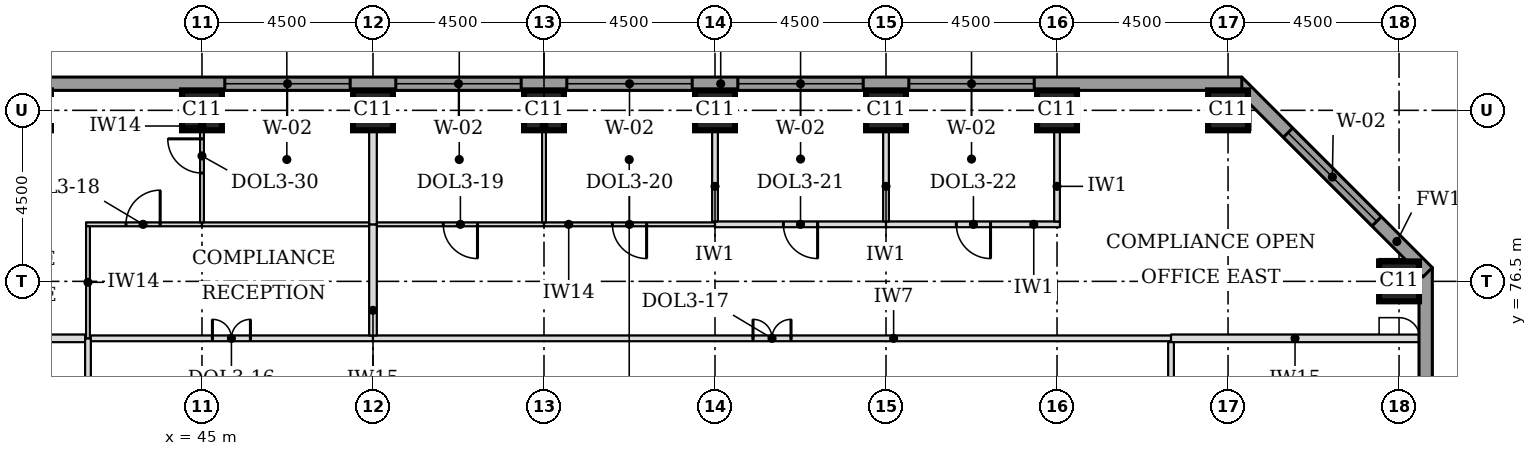
"""IFC4 building model, lengths in metres.
Left out: names, types, materials, properties, quantities, classifications, styles, units other than length and angle.
Written with IfcOpenShell. Run it as: python <this file> out.ifc"""

import sys

from ifc_helpers import new_model, si_unit, direction, frame, frame_2d, origin, origin_2d, place, context, subcontext, project, spatial, rectangle, extrude, element, fill, save


model = new_model("IFC4")
c1 = context("Model", 3, precision=1e-05, world=origin(), true_north=direction((0.0, 1.0)))
c2 = subcontext(c1, "Body", "Model", "MODEL_VIEW")
j1 = project(units=[si_unit("LENGTHUNIT", "METRE"), si_unit("PLANEANGLEUNIT", "RADIAN")], contexts=[c1])
p1 = place(None, origin())
s1 = spatial("IfcSite", under=j1, at=p1, CompositionType="ELEMENT")
p2 = place(p1, origin())
s2 = spatial("IfcBuilding", under=s1, at=p2, CompositionType="ELEMENT")
p3 = place(p2, frame((0.0, 0.0, 97.4)))
s3 = spatial("IfcBuildingStorey", under=s2, at=p3, CompositionType="ELEMENT", Elevation=97.4)
for number, where, z_axis, x_axis in (
    (1, (76.5, 76.5, 0.0), (0.0, 0.0, 1.0), (1.0, 0.0, 0.0)),
    (2, (45.0, 81.0, 0.0), (0.0, 0.0, 1.0), (1.0, 0.0, 0.0)),
    (3, (49.5, 81.0, 0.0), (0.0, 0.0, 1.0), (1.0, 0.0, 0.0)),
    (4, (54.0, 81.0, 0.0), (0.0, 0.0, 1.0), (1.0, 0.0, 0.0)),
    (5, (58.5, 81.0, 0.0), (0.0, 0.0, 1.0), (1.0, 0.0, 0.0)),
    (6, (63.0, 81.0, 0.0), (0.0, 0.0, 1.0), (1.0, 0.0, 0.0)),
    (7, (67.5, 81.0, 0.0), (0.0, 0.0, 1.0), (1.0, 0.0, 0.0)),
    (8, (72.0, 81.0, 0.0), (0.0, 0.0, 1.0), (1.0, 0.0, 0.0)),
):
    element("IfcColumn", number, at=place(p3, frame(where, z_axis=z_axis, x_axis=x_axis)), inside=s3, PredefinedType="COLUMN", context=c2, shape_type="SweptSolid", body=[
        extrude(rectangle(XDim=1.05, YDim=1.05, at=origin_2d()), origin(), (0.0, 0.0, 1.0), 3.7),
    ])
p4 = place(p3, frame((77.2, 44.638, 0.0), z_axis=(0.0, 0.0, 1.0), x_axis=(0.0, 1.0, 0.0)))
e9 = element("IfcWall", 9, at=p4, inside=s3, PredefinedType="STANDARD", context=c2, shape_type="SweptSolid", body=[
    extrude(rectangle(XDim=32.225, YDim=0.35, at=frame_2d((16.112, 0.0))), origin(), (0.0, 0.0, 1.0), 3.525),
])
p5 = place(p4, frame((5.462, 0.0, 0.9)))
e10 = element("IfcOpeningElement", 10, at=p5, cuts=e9, PredefinedType="OPENING", context=c2, shape_type="SweptSolid", body=[
    extrude(rectangle(XDim=3.3, YDim=1.9, at=frame_2d((1.65, 0.95))), frame((0.0, 0.185, 0.0), z_axis=(0.0, -1.0, 0.0), x_axis=(1.0, 0.0, 0.0)), (0.0, 0.0, 1.0), 0.37),
])
p6 = place(p4, frame((9.962, 0.0, 0.9)))
e11 = element("IfcOpeningElement", 11, at=p6, cuts=e9, PredefinedType="OPENING", context=c2, shape_type="SweptSolid", body=[
    extrude(rectangle(XDim=3.3, YDim=1.9, at=frame_2d((1.65, 0.95))), frame((0.0, 0.185, 0.0), z_axis=(0.0, -1.0, 0.0), x_axis=(1.0, 0.0, 0.0)), (0.0, 0.0, 1.0), 0.37),
])
p7 = place(p4, frame((14.462, 0.0, 0.9)))
e12 = element("IfcOpeningElement", 12, at=p7, cuts=e9, PredefinedType="OPENING", context=c2, shape_type="SweptSolid", body=[
    extrude(rectangle(XDim=3.3, YDim=1.9, at=frame_2d((1.65, 0.95))), frame((0.0, 0.185, 0.0), z_axis=(0.0, -1.0, 0.0), x_axis=(1.0, 0.0, 0.0)), (0.0, 0.0, 1.0), 0.37),
])
p8 = place(p4, frame((18.962, 0.0, 0.9)))
e13 = element("IfcOpeningElement", 13, at=p8, cuts=e9, PredefinedType="OPENING", context=c2, shape_type="SweptSolid", body=[
    extrude(rectangle(XDim=3.3, YDim=1.9, at=frame_2d((1.65, 0.95))), frame((0.0, 0.185, 0.0), z_axis=(0.0, -1.0, 0.0), x_axis=(1.0, 0.0, 0.0)), (0.0, 0.0, 1.0), 0.37),
])
p9 = place(p4, frame((23.462, 0.0, 0.9)))
e14 = element("IfcOpeningElement", 14, at=p9, cuts=e9, PredefinedType="OPENING", context=c2, shape_type="SweptSolid", body=[
    extrude(rectangle(XDim=3.3, YDim=1.9, at=frame_2d((1.65, 0.95))), frame((0.0, 0.185, 0.0), z_axis=(0.0, -1.0, 0.0), x_axis=(1.0, 0.0, 0.0)), (0.0, 0.0, 1.0), 0.37),
])
p10 = place(p3, frame((77.251, 76.739, 0.0), z_axis=(0.0, 0.0, 1.0), x_axis=(-0.707106781187, 0.707106781187, 0.0)))
e15 = element("IfcWall", 15, at=p10, inside=s3, PredefinedType="STANDARD", context=c2, shape_type="SweptSolid", body=[
    extrude(rectangle(XDim=7.089, YDim=0.35, at=frame_2d((3.544, 0.0))), origin(), (0.0, 0.0, 1.0), 3.525),
])
p11 = place(p10, frame((1.894, 0.0, 0.9)))
e16 = element("IfcOpeningElement", 16, at=p11, cuts=e15, PredefinedType="OPENING", context=c2, shape_type="SweptSolid", body=[
    extrude(rectangle(XDim=3.3, YDim=1.9, at=frame_2d((1.65, 0.95))), frame((0.0, 0.185, 0.0), z_axis=(0.0, -1.0, 0.0), x_axis=(1.0, 0.0, 0.0)), (0.0, 0.0, 1.0), 0.37),
])
p12 = place(p3, frame((72.362, 81.7, 0.0), z_axis=(0.0, 0.0, 1.0), x_axis=(-1.0, 0.0, 0.0)))
e17 = element("IfcWall", 17, at=p12, inside=s3, PredefinedType="STANDARD", context=c2, shape_type="SweptSolid", body=[
    extrude(rectangle(XDim=32.225, YDim=0.35, at=frame_2d((16.112, 0.0))), origin(), (0.0, 0.0, 1.0), 3.525),
])
p13 = place(p12, frame((5.462, 0.0, 0.9)))
e18 = element("IfcOpeningElement", 18, at=p13, cuts=e17, PredefinedType="OPENING", context=c2, shape_type="SweptSolid", body=[
    extrude(rectangle(XDim=3.3, YDim=1.9, at=frame_2d((1.65, 0.95))), frame((0.0, 0.185, 0.0), z_axis=(0.0, -1.0, 0.0), x_axis=(1.0, 0.0, 0.0)), (0.0, 0.0, 1.0), 0.37),
])
p14 = place(p12, frame((9.962, 0.0, 0.9)))
e19 = element("IfcOpeningElement", 19, at=p14, cuts=e17, PredefinedType="OPENING", context=c2, shape_type="SweptSolid", body=[
    extrude(rectangle(XDim=3.3, YDim=1.9, at=frame_2d((1.65, 0.95))), frame((0.0, 0.185, 0.0), z_axis=(0.0, -1.0, 0.0), x_axis=(1.0, 0.0, 0.0)), (0.0, 0.0, 1.0), 0.37),
])
p15 = place(p12, frame((14.462, 0.0, 0.9)))
e20 = element("IfcOpeningElement", 20, at=p15, cuts=e17, PredefinedType="OPENING", context=c2, shape_type="SweptSolid", body=[
    extrude(rectangle(XDim=3.3, YDim=1.9, at=frame_2d((1.65, 0.95))), frame((0.0, 0.185, 0.0), z_axis=(0.0, -1.0, 0.0), x_axis=(1.0, 0.0, 0.0)), (0.0, 0.0, 1.0), 0.37),
])
p16 = place(p12, frame((18.962, 0.0, 0.9)))
e21 = element("IfcOpeningElement", 21, at=p16, cuts=e17, PredefinedType="OPENING", context=c2, shape_type="SweptSolid", body=[
    extrude(rectangle(XDim=3.3, YDim=1.9, at=frame_2d((1.65, 0.95))), frame((0.0, 0.185, 0.0), z_axis=(0.0, -1.0, 0.0), x_axis=(1.0, 0.0, 0.0)), (0.0, 0.0, 1.0), 0.37),
])
p17 = place(p12, frame((23.462, 0.0, 0.9)))
e22 = element("IfcOpeningElement", 22, at=p17, cuts=e17, PredefinedType="OPENING", context=c2, shape_type="SweptSolid", body=[
    extrude(rectangle(XDim=3.3, YDim=1.9, at=frame_2d((1.65, 0.95))), frame((0.0, 0.185, 0.0), z_axis=(0.0, -1.0, 0.0), x_axis=(1.0, 0.0, 0.0)), (0.0, 0.0, 1.0), 0.37),
])
p18 = place(p3, frame((35.475, 75.0, 0.0), z_axis=(0.0, 0.0, 1.0), x_axis=(1.0, 0.0, 0.0)))
e23 = element("IfcWall", 23, at=p18, inside=s3, PredefinedType="PARTITIONING", context=c2, shape_type="SweptSolid", body=[
    extrude(rectangle(XDim=6.45, YDim=0.2, at=frame_2d((3.225, 0.0))), origin(), (0.0, 0.0, 1.0), 3.55),
])
p19 = place(p3, frame((42.075, 75.0, 0.0), z_axis=(0.0, 0.0, 1.0), x_axis=(1.0, 0.0, 0.0)))
e24 = element("IfcWall", 24, at=p19, inside=s3, PredefinedType="PARTITIONING", context=c2, shape_type="SweptSolid", body=[
    extrude(rectangle(XDim=7.425, YDim=0.15, at=frame_2d((3.712, 0.0))), origin(), (0.0, 0.0, 1.0), 3.55),
])
p20 = place(p19, frame((3.2, 0.0, 0.0)))
e25 = element("IfcOpeningElement", 25, at=p20, cuts=e24, PredefinedType="OPENING", context=c2, shape_type="SweptSolid", body=[
    extrude(rectangle(XDim=1.0, YDim=2.1, at=frame_2d((0.5, 1.05))), frame((0.0, 0.085, 0.0), z_axis=(0.0, -1.0, 0.0), x_axis=(1.0, 0.0, 0.0)), (0.0, 0.0, 1.0), 0.17),
])
p21 = place(p3, frame((49.5, 75.0, 0.0), z_axis=(0.0, 0.0, 1.0), x_axis=(1.0, 0.0, 0.0)))
e26 = element("IfcWall", 26, at=p21, inside=s3, PredefinedType="PARTITIONING", context=c2, shape_type="SweptSolid", body=[
    extrude(rectangle(XDim=21.0, YDim=0.15, at=frame_2d((10.5, 0.0))), origin(), (0.0, 0.0, 1.0), 3.55),
])
p22 = place(p21, frame((10.0, 0.0, 0.0)))
e27 = element("IfcOpeningElement", 27, at=p22, cuts=e26, PredefinedType="OPENING", context=c2, shape_type="SweptSolid", body=[
    extrude(rectangle(XDim=1.0, YDim=2.1, at=frame_2d((0.5, 1.05))), frame((0.0, 0.085, 0.0), z_axis=(0.0, -1.0, 0.0), x_axis=(1.0, 0.0, 0.0)), (0.0, 0.0, 1.0), 0.17),
])
p23 = place(p3, frame((70.5, 75.0, 0.0), z_axis=(0.0, 0.0, 1.0), x_axis=(1.0, 0.0, 0.0)))
e28 = element("IfcWall", 28, at=p23, inside=s3, PredefinedType="PARTITIONING", context=c2, shape_type="SweptSolid", body=[
    extrude(rectangle(XDim=6.525, YDim=0.2, at=frame_2d((3.262, 0.0))), origin(), (0.0, 0.0, 1.0), 3.55),
])
p24 = place(p3, frame((41.95, 78.0, 0.0), z_axis=(0.0, 0.0, 1.0), x_axis=(1.0, 0.0, 0.0)))
e29 = element("IfcWall", 29, at=p24, inside=s3, PredefinedType="PARTITIONING", context=c2, shape_type="SweptSolid", body=[
    extrude(rectangle(XDim=3.05, YDim=0.1, at=frame_2d((1.525, 0.0))), origin(), (0.0, 0.0, 1.0), 3.55),
])
p25 = place(p24, frame((1.05, 0.0, 0.0)))
e30 = element("IfcOpeningElement", 30, at=p25, cuts=e29, PredefinedType="OPENING", context=c2, shape_type="SweptSolid", body=[
    extrude(rectangle(XDim=0.9, YDim=2.1, at=frame_2d((0.45, 1.05))), frame((0.0, 0.06, 0.0), z_axis=(0.0, -1.0, 0.0), x_axis=(1.0, 0.0, 0.0)), (0.0, 0.0, 1.0), 0.12),
])
p26 = place(p3, frame((45.0, 78.0, 0.0), z_axis=(0.0, 0.0, 1.0), x_axis=(1.0, 0.0, 0.0)))
e31 = element("IfcWall", 31, at=p26, inside=s3, PredefinedType="PARTITIONING", context=c2, shape_type="SweptSolid", body=[
    extrude(rectangle(XDim=4.4, YDim=0.1, at=frame_2d((2.2, 0.0))), origin(), (0.0, 0.0, 1.0), 3.55),
])
p27 = place(p3, frame((49.6, 78.0, 0.0), z_axis=(0.0, 0.0, 1.0), x_axis=(1.0, 0.0, 0.0)))
e32 = element("IfcWall", 32, at=p27, inside=s3, PredefinedType="PARTITIONING", context=c2, shape_type="SweptSolid", body=[
    extrude(rectangle(XDim=4.4, YDim=0.1, at=frame_2d((2.2, 0.0))), origin(), (0.0, 0.0, 1.0), 3.55),
])
p28 = place(p27, frame((1.75, 0.0, 0.0)))
e33 = element("IfcOpeningElement", 33, at=p28, cuts=e32, PredefinedType="OPENING", context=c2, shape_type="SweptSolid", body=[
    extrude(rectangle(XDim=0.9, YDim=2.1, at=frame_2d((0.45, 1.05))), frame((0.0, 0.06, 0.0), z_axis=(0.0, -1.0, 0.0), x_axis=(1.0, 0.0, 0.0)), (0.0, 0.0, 1.0), 0.12),
])
p29 = place(p3, frame((54.0, 78.0, 0.0), z_axis=(0.0, 0.0, 1.0), x_axis=(1.0, 0.0, 0.0)))
e34 = element("IfcWall", 34, at=p29, inside=s3, PredefinedType="PARTITIONING", context=c2, shape_type="SweptSolid", body=[
    extrude(rectangle(XDim=4.5, YDim=0.1, at=frame_2d((2.25, 0.0))), origin(), (0.0, 0.0, 1.0), 3.55),
])
p30 = place(p29, frame((1.8, 0.0, 0.0)))
e35 = element("IfcOpeningElement", 35, at=p30, cuts=e34, PredefinedType="OPENING", context=c2, shape_type="SweptSolid", body=[
    extrude(rectangle(XDim=0.9, YDim=2.1, at=frame_2d((0.45, 1.05))), frame((0.0, 0.06, 0.0), z_axis=(0.0, -1.0, 0.0), x_axis=(1.0, 0.0, 0.0)), (0.0, 0.0, 1.0), 0.12),
])
p31 = place(p3, frame((58.5, 78.0, 0.0), z_axis=(0.0, 0.0, 1.0), x_axis=(1.0, 0.0, 0.0)))
e36 = element("IfcWall", 36, at=p31, inside=s3, PredefinedType="PARTITIONING", context=c2, shape_type="SweptSolid", body=[
    extrude(rectangle(XDim=4.5, YDim=0.15, at=frame_2d((2.25, 0.0))), origin(), (0.0, 0.0, 1.0), 3.55),
])
p32 = place(p31, frame((1.8, 0.0, 0.0)))
e37 = element("IfcOpeningElement", 37, at=p32, cuts=e36, PredefinedType="OPENING", context=c2, shape_type="SweptSolid", body=[
    extrude(rectangle(XDim=0.9, YDim=2.1, at=frame_2d((0.45, 1.05))), frame((0.0, 0.085, 0.0), z_axis=(0.0, -1.0, 0.0), x_axis=(1.0, 0.0, 0.0)), (0.0, 0.0, 1.0), 0.17),
])
p33 = place(p3, frame((63.0, 78.0, 0.0), z_axis=(0.0, 0.0, 1.0), x_axis=(1.0, 0.0, 0.0)))
e38 = element("IfcWall", 38, at=p33, inside=s3, PredefinedType="PARTITIONING", context=c2, shape_type="SweptSolid", body=[
    extrude(rectangle(XDim=4.575, YDim=0.15, at=frame_2d((2.288, 0.0))), origin(), (0.0, 0.0, 1.0), 3.55),
])
p34 = place(p33, frame((1.85, 0.0, 0.0)))
e39 = element("IfcOpeningElement", 39, at=p34, cuts=e38, PredefinedType="OPENING", context=c2, shape_type="SweptSolid", body=[
    extrude(rectangle(XDim=0.9, YDim=2.1, at=frame_2d((0.45, 1.05))), frame((0.0, 0.085, 0.0), z_axis=(0.0, -1.0, 0.0), x_axis=(1.0, 0.0, 0.0)), (0.0, 0.0, 1.0), 0.17),
])
p35 = place(p3, frame((42.0, 57.075, 0.0), z_axis=(0.0, 0.0, 1.0), x_axis=(0.0, 1.0, 0.0)))
e40 = element("IfcWall", 40, at=p35, inside=s3, PredefinedType="PARTITIONING", context=c2, shape_type="SweptSolid", body=[
    extrude(rectangle(XDim=17.925, YDim=0.15, at=frame_2d((8.962, 0.0))), origin(), (0.0, 0.0, 1.0), 3.55),
])
p36 = place(p3, frame((70.5, 61.5, 0.0), z_axis=(0.0, 0.0, 1.0), x_axis=(0.0, 1.0, 0.0)))
e41 = element("IfcWall", 41, at=p36, inside=s3, PredefinedType="PARTITIONING", context=c2, shape_type="SweptSolid", body=[
    extrude(rectangle(XDim=13.4, YDim=0.15, at=frame_2d((6.7, 0.0))), origin(), (0.0, 0.0, 1.0), 3.55),
])
p37 = place(p36, frame((6.2, 0.0, 0.0)))
e42 = element("IfcOpeningElement", 42, at=p37, cuts=e41, PredefinedType="OPENING", context=c2, shape_type="SweptSolid", body=[
    extrude(rectangle(XDim=1.0, YDim=2.1, at=frame_2d((0.5, 1.05))), frame((0.0, 0.085, 0.0), z_axis=(0.0, -1.0, 0.0), x_axis=(1.0, 0.0, 0.0)), (0.0, 0.0, 1.0), 0.17),
])
p38 = place(p3, frame((42.0, 75.0, 0.0), z_axis=(0.0, 0.0, 1.0), x_axis=(0.0, 1.0, 0.0)))
e43 = element("IfcWall", 43, at=p38, inside=s3, PredefinedType="PARTITIONING", context=c2, shape_type="SweptSolid", body=[
    extrude(rectangle(XDim=2.95, YDim=0.1, at=frame_2d((1.475, 0.0))), origin(), (0.0, 0.0, 1.0), 3.55),
])
p39 = place(p3, frame((49.5, 75.075, 0.0), z_axis=(0.0, 0.0, 1.0), x_axis=(0.0, 1.0, 0.0)))
e44 = element("IfcWall", 44, at=p39, inside=s3, PredefinedType="PARTITIONING", context=c2, shape_type="SweptSolid", body=[
    extrude(rectangle(XDim=2.925, YDim=0.2, at=frame_2d((1.462, 0.0))), origin(), (0.0, 0.0, 1.0), 3.55),
])
p40 = place(p3, frame((49.5, 78.0, 0.0), z_axis=(0.0, 0.0, 1.0), x_axis=(0.0, 1.0, 0.0)))
e45 = element("IfcWall", 45, at=p40, inside=s3, PredefinedType="PARTITIONING", context=c2, shape_type="SweptSolid", body=[
    extrude(rectangle(XDim=3.525, YDim=0.2, at=frame_2d((1.762, 0.0))), origin(), (0.0, 0.0, 1.0), 3.55),
])
p41 = place(p3, frame((45.0, 78.05, 0.0), z_axis=(0.0, 0.0, 1.0), x_axis=(0.0, 1.0, 0.0)))
e46 = element("IfcWall", 46, at=p41, inside=s3, PredefinedType="PARTITIONING", context=c2, shape_type="SweptSolid", body=[
    extrude(rectangle(XDim=3.475, YDim=0.1, at=frame_2d((1.737, 0.0))), origin(), (0.0, 0.0, 1.0), 3.55),
])
p42 = place(p41, frame((1.3, 0.0, 0.0)))
e47 = element("IfcOpeningElement", 47, at=p42, cuts=e46, PredefinedType="OPENING", context=c2, shape_type="SweptSolid", body=[
    extrude(rectangle(XDim=0.9, YDim=2.1, at=frame_2d((0.45, 1.05))), frame((0.0, 0.06, 0.0), z_axis=(0.0, -1.0, 0.0), x_axis=(1.0, 0.0, 0.0)), (0.0, 0.0, 1.0), 0.12),
])
p43 = place(p3, frame((54.0, 78.05, 0.0), z_axis=(0.0, 0.0, 1.0), x_axis=(0.0, 1.0, 0.0)))
e48 = element("IfcWall", 48, at=p43, inside=s3, PredefinedType="PARTITIONING", context=c2, shape_type="SweptSolid", body=[
    extrude(rectangle(XDim=3.475, YDim=0.1, at=frame_2d((1.737, 0.0))), origin(), (0.0, 0.0, 1.0), 3.55),
])
for number, where, z_axis, x_axis in (
    (49, (58.5, 78.075, 0.0), (0.0, 0.0, 1.0), (0.0, 1.0, 0.0)),
    (50, (63.0, 78.075, 0.0), (0.0, 0.0, 1.0), (0.0, 1.0, 0.0)),
    (51, (67.5, 78.075, 0.0), (0.0, 0.0, 1.0), (0.0, 1.0, 0.0)),
):
    element("IfcWall", number, at=place(p3, frame(where, z_axis=z_axis, x_axis=x_axis)), inside=s3, PredefinedType="PARTITIONING", context=c2, shape_type="SweptSolid", body=[
        extrude(rectangle(XDim=3.45, YDim=0.15, at=frame_2d((1.725, 0.0))), origin(), (0.0, 0.0, 1.0), 3.55),
    ])
p44 = place(p11, origin())
e52 = element("IfcWindow", 52, at=p44, inside=s3, PartitioningType="SINGLE_PANEL", PredefinedType="WINDOW", context=c2, shape_type="SweptSolid", body=[
    extrude(rectangle(XDim=3.3, YDim=1.9, at=frame_2d((1.65, 0.95))), frame((0.0, 0.085, 0.0), z_axis=(0.0, -1.0, 0.0), x_axis=(1.0, 0.0, 0.0)), (0.0, 0.0, 1.0), 0.06),
])
fill(e16, e52)
p45 = place(p13, origin())
e53 = element("IfcWindow", 53, at=p45, inside=s3, PartitioningType="SINGLE_PANEL", PredefinedType="WINDOW", context=c2, shape_type="SweptSolid", body=[
    extrude(rectangle(XDim=3.3, YDim=1.9, at=frame_2d((1.65, 0.95))), frame((0.0, 0.085, 0.0), z_axis=(0.0, -1.0, 0.0), x_axis=(1.0, 0.0, 0.0)), (0.0, 0.0, 1.0), 0.06),
])
fill(e18, e53)
p46 = place(p14, origin())
e54 = element("IfcWindow", 54, at=p46, inside=s3, PartitioningType="SINGLE_PANEL", PredefinedType="WINDOW", context=c2, shape_type="SweptSolid", body=[
    extrude(rectangle(XDim=3.3, YDim=1.9, at=frame_2d((1.65, 0.95))), frame((0.0, 0.085, 0.0), z_axis=(0.0, -1.0, 0.0), x_axis=(1.0, 0.0, 0.0)), (0.0, 0.0, 1.0), 0.06),
])
fill(e19, e54)
p47 = place(p15, origin())
e55 = element("IfcWindow", 55, at=p47, inside=s3, PartitioningType="SINGLE_PANEL", PredefinedType="WINDOW", context=c2, shape_type="SweptSolid", body=[
    extrude(rectangle(XDim=3.3, YDim=1.9, at=frame_2d((1.65, 0.95))), frame((0.0, 0.085, 0.0), z_axis=(0.0, -1.0, 0.0), x_axis=(1.0, 0.0, 0.0)), (0.0, 0.0, 1.0), 0.06),
])
fill(e20, e55)
p48 = place(p16, origin())
e56 = element("IfcWindow", 56, at=p48, inside=s3, PartitioningType="SINGLE_PANEL", PredefinedType="WINDOW", context=c2, shape_type="SweptSolid", body=[
    extrude(rectangle(XDim=3.3, YDim=1.9, at=frame_2d((1.65, 0.95))), frame((0.0, 0.085, 0.0), z_axis=(0.0, -1.0, 0.0), x_axis=(1.0, 0.0, 0.0)), (0.0, 0.0, 1.0), 0.06),
])
fill(e21, e56)
p49 = place(p17, origin())
e57 = element("IfcWindow", 57, at=p49, inside=s3, PartitioningType="SINGLE_PANEL", PredefinedType="WINDOW", context=c2, shape_type="SweptSolid", body=[
    extrude(rectangle(XDim=3.3, YDim=1.9, at=frame_2d((1.65, 0.95))), frame((0.0, 0.085, 0.0), z_axis=(0.0, -1.0, 0.0), x_axis=(1.0, 0.0, 0.0)), (0.0, 0.0, 1.0), 0.06),
])
fill(e22, e57)
p50 = place(p20, origin())
e58 = element("IfcDoor", 58, at=p50, inside=s3, OperationType="DOUBLE_DOOR_SINGLE_SWING", PredefinedType="DOOR", context=c2, shape_type="SweptSolid", body=[
    extrude(rectangle(XDim=1.0, YDim=2.1, at=frame_2d((0.5, 1.05))), frame((0.0, 0.025, 0.0), z_axis=(0.0, -1.0, 0.0), x_axis=(1.0, 0.0, 0.0)), (0.0, 0.0, 1.0), 0.05),
])
fill(e25, e58)
p51 = place(p25, origin())
e59 = element("IfcDoor", 59, at=p51, inside=s3, OperationType="SINGLE_SWING_RIGHT", PredefinedType="DOOR", context=c2, shape_type="SweptSolid", body=[
    extrude(rectangle(XDim=0.9, YDim=2.1, at=frame_2d((0.45, 1.05))), frame((0.0, 0.025, 0.0), z_axis=(0.0, -1.0, 0.0), x_axis=(1.0, 0.0, 0.0)), (0.0, 0.0, 1.0), 0.05),
])
fill(e30, e59)
p52 = place(p42, origin())
e60 = element("IfcDoor", 60, at=p52, inside=s3, OperationType="SINGLE_SWING_RIGHT", PredefinedType="DOOR", context=c2, shape_type="SweptSolid", body=[
    extrude(rectangle(XDim=0.9, YDim=2.1, at=frame_2d((0.45, 1.05))), frame((0.0, 0.025, 0.0), z_axis=(0.0, -1.0, 0.0), x_axis=(1.0, 0.0, 0.0)), (0.0, 0.0, 1.0), 0.05),
])
fill(e47, e60)
p53 = place(p22, origin())
e61 = element("IfcDoor", 61, at=p53, inside=s3, OperationType="DOUBLE_DOOR_SINGLE_SWING", PredefinedType="DOOR", context=c2, shape_type="SweptSolid", body=[
    extrude(rectangle(XDim=1.0, YDim=2.1, at=frame_2d((0.5, 1.05))), frame((0.0, 0.025, 0.0), z_axis=(0.0, -1.0, 0.0), x_axis=(1.0, 0.0, 0.0)), (0.0, 0.0, 1.0), 0.05),
])
fill(e27, e61)
p54 = place(p28, frame((0.9, 0.0, 0.0), z_axis=(0.0, 0.0, 1.0), x_axis=(-1.0, 0.0, 0.0)))
e62 = element("IfcDoor", 62, at=p54, inside=s3, OperationType="SINGLE_SWING_LEFT", PredefinedType="DOOR", context=c2, shape_type="SweptSolid", body=[
    extrude(rectangle(XDim=0.9, YDim=2.1, at=frame_2d((0.45, 1.05))), frame((0.0, 0.025, 0.0), z_axis=(0.0, -1.0, 0.0), x_axis=(1.0, 0.0, 0.0)), (0.0, 0.0, 1.0), 0.05),
])
fill(e33, e62)
p55 = place(p30, frame((0.9, 0.0, 0.0), z_axis=(0.0, 0.0, 1.0), x_axis=(-1.0, 0.0, 0.0)))
e63 = element("IfcDoor", 63, at=p55, inside=s3, OperationType="SINGLE_SWING_LEFT", PredefinedType="DOOR", context=c2, shape_type="SweptSolid", body=[
    extrude(rectangle(XDim=0.9, YDim=2.1, at=frame_2d((0.45, 1.05))), frame((0.0, 0.025, 0.0), z_axis=(0.0, -1.0, 0.0), x_axis=(1.0, 0.0, 0.0)), (0.0, 0.0, 1.0), 0.05),
])
fill(e35, e63)
p56 = place(p32, frame((0.9, 0.0, 0.0), z_axis=(0.0, 0.0, 1.0), x_axis=(-1.0, 0.0, 0.0)))
e64 = element("IfcDoor", 64, at=p56, inside=s3, OperationType="SINGLE_SWING_LEFT", PredefinedType="DOOR", context=c2, shape_type="SweptSolid", body=[
    extrude(rectangle(XDim=0.9, YDim=2.1, at=frame_2d((0.45, 1.05))), frame((0.0, 0.025, 0.0), z_axis=(0.0, -1.0, 0.0), x_axis=(1.0, 0.0, 0.0)), (0.0, 0.0, 1.0), 0.05),
])
fill(e37, e64)
p57 = place(p34, frame((0.9, 0.0, 0.0), z_axis=(0.0, 0.0, 1.0), x_axis=(-1.0, 0.0, 0.0)))
e65 = element("IfcDoor", 65, at=p57, inside=s3, OperationType="SINGLE_SWING_LEFT", PredefinedType="DOOR", context=c2, shape_type="SweptSolid", body=[
    extrude(rectangle(XDim=0.9, YDim=2.1, at=frame_2d((0.45, 1.05))), frame((0.0, 0.025, 0.0), z_axis=(0.0, -1.0, 0.0), x_axis=(1.0, 0.0, 0.0)), (0.0, 0.0, 1.0), 0.05),
])
fill(e39, e65)
save(model, sys.argv[1])
